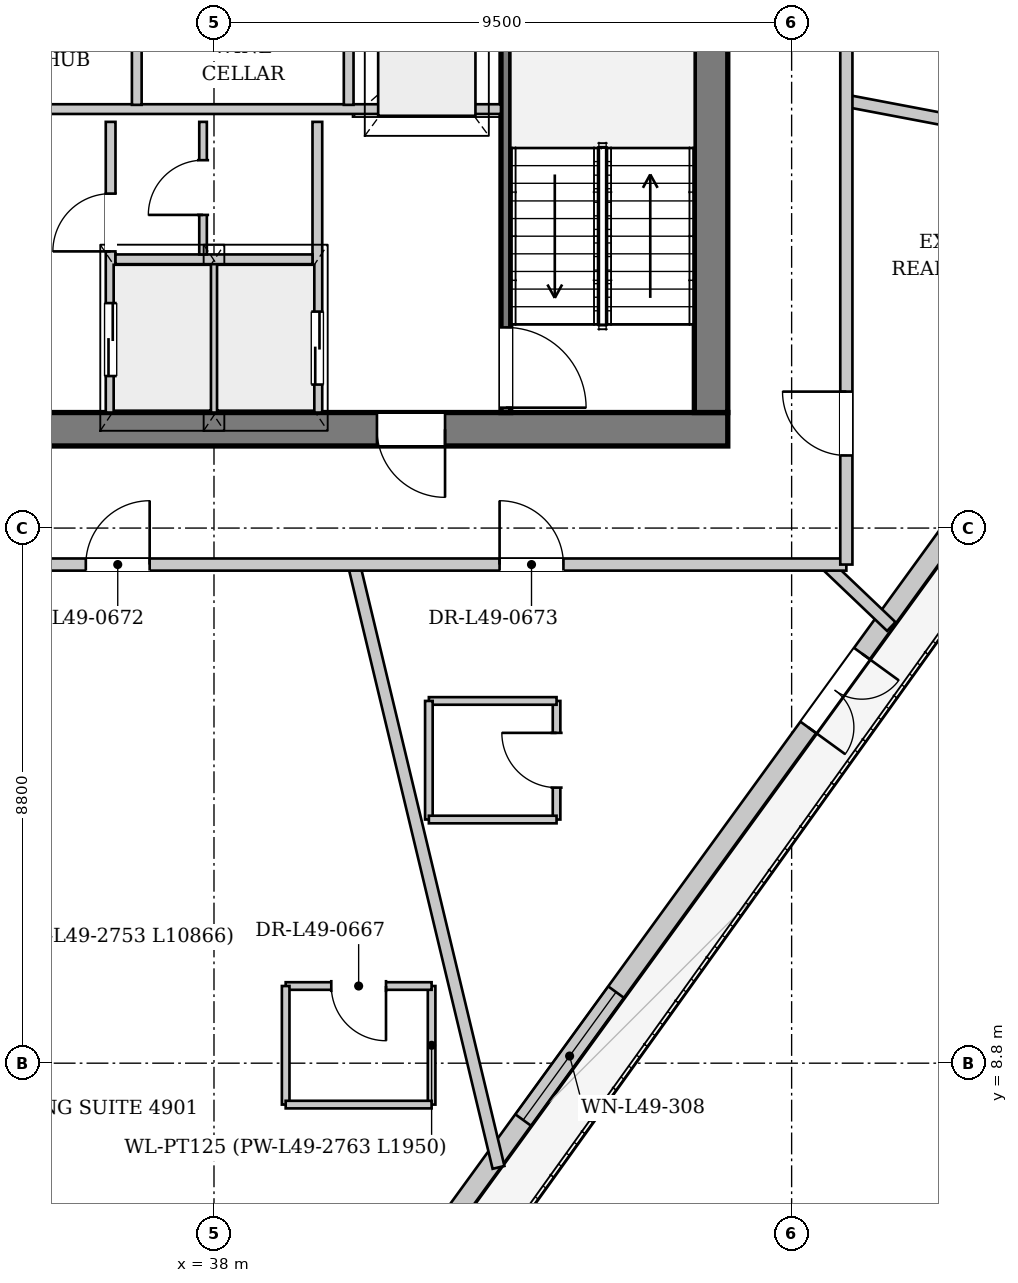
"""IFC4 building model, lengths in metres.
Left out: names, types, materials, properties, quantities, classifications, styles, units other than length and angle.
Written with IfcOpenShell. Run it as: python <this file> out.ifc"""

import sys

from ifc_helpers import new_model, si_unit, direction, frame, frame_2d, origin, place, context, subcontext, project, spatial, rectangle, extrude, source, transform, mapped, element, fill, save


model = new_model("IFC4")
c1 = context("Model", 3, precision=1e-05, world=origin(), true_north=direction((0.0, 1.0)))
c2 = subcontext(c1, "Body", "Model", "MODEL_VIEW")
j1 = project(units=[si_unit("LENGTHUNIT", "METRE"), si_unit("PLANEANGLEUNIT", "RADIAN")], contexts=[c1])
p1 = place(None, origin())
s1 = spatial("IfcSite", under=j1, at=p1, CompositionType="ELEMENT")
p2 = place(p1, origin())
s2 = spatial("IfcBuilding", under=s1, at=p2, CompositionType="ELEMENT")
p3 = place(p2, frame((0.0, 0.0, 185.65)))
s3 = spatial("IfcBuildingStorey", under=s2, at=p3, CompositionType="ELEMENT", Elevation=185.65)
p4 = place(p3, frame((53.034, 21.565, 0.0), z_axis=(0.0, 0.0, 1.0), x_axis=(-0.58764790483, -0.809116765337, 0.0)))
e1 = element("IfcWall", 1, at=p4, inside=s3, PredefinedType="SOLIDWALL", context=c2, shape_type="SweptSolid", body=[
    extrude(rectangle(XDim=23.285, YDim=0.32, at=frame_2d((11.643, 0.0))), origin(), (0.0, 0.0, 1.0), 2.722),
])
p5 = place(p4, frame((7.451, 0.0, 0.0)))
e2 = element("IfcOpeningElement", 2, at=p5, cuts=e1, PredefinedType="OPENING", context=c2, shape_type="SweptSolid", body=[
    extrude(rectangle(XDim=1.5, YDim=2.3, at=frame_2d((0.75, 1.15))), frame((0.0, 0.17, 0.0), z_axis=(0.0, -1.0, 0.0), x_axis=(1.0, 0.0, 0.0)), (0.0, 0.0, 1.0), 0.34),
])
p6 = place(p4, frame((14.331, 0.0, 0.252)))
e3 = element("IfcOpeningElement", 3, at=p6, cuts=e1, PredefinedType="OPENING", context=c2, shape_type="SweptSolid", body=[
    extrude(rectangle(XDim=2.6, YDim=2.35, at=frame_2d((1.3, 1.175))), frame((0.0, 0.17, 0.0), z_axis=(0.0, -1.0, 0.0), x_axis=(1.0, 0.0, 0.0)), (0.0, 0.0, 1.0), 0.34),
])
p7 = place(p3, frame((46.45, 19.225, 0.0), z_axis=(0.0, 0.0, 1.0), x_axis=(-1.0, 0.0, 0.0)))
e4 = element("IfcWall", 4, at=p7, inside=s3, PredefinedType="SHEAR", context=c2, shape_type="SweptSolid", body=[
    extrude(rectangle(XDim=16.9, YDim=0.55, at=frame_2d((8.45, 0.0))), origin(), (0.0, 0.0, 1.0), 3.33),
])
p8 = place(p7, frame((4.65, 0.0, 0.0)))
e5 = element("IfcOpeningElement", 5, at=p8, cuts=e4, PredefinedType="OPENING", context=c2, shape_type="SweptSolid", body=[
    extrude(rectangle(XDim=1.12, YDim=2.25, at=frame_2d((0.56, 1.125))), frame((0.0, 0.285, 0.0), z_axis=(0.0, -1.0, 0.0), x_axis=(1.0, 0.0, 0.0)), (0.0, 0.0, 1.0), 0.57),
])
p9 = place(p7, frame((11.15, 0.0, 0.0)))
e6 = element("IfcOpeningElement", 6, at=p9, cuts=e4, PredefinedType="OPENING", context=c2, shape_type="SweptSolid", body=[
    extrude(rectangle(XDim=1.12, YDim=2.25, at=frame_2d((0.56, 1.125))), frame((0.0, 0.285, 0.0), z_axis=(0.0, -1.0, 0.0), x_axis=(1.0, 0.0, 0.0)), (0.0, 0.0, 1.0), 0.57),
])
p10 = place(p3, frame((46.175, 33.7, 0.0), z_axis=(0.0, 0.0, 1.0), x_axis=(0.0, -1.0, 0.0)))
e7 = element("IfcWall", 7, at=p10, inside=s3, PredefinedType="SHEAR", context=c2, shape_type="SweptSolid", body=[
    extrude(rectangle(XDim=14.2, YDim=0.55, at=frame_2d((7.1, 0.0))), origin(), (0.0, 0.0, 1.0), 3.33),
])
p11 = place(p10, frame((5.18, 0.0, 0.0)))
e8 = element("IfcOpeningElement", 8, at=p11, cuts=e7, PredefinedType="OPENING", context=c2, shape_type="SweptSolid", body=[
    extrude(rectangle(XDim=1.6, YDim=2.2, at=frame_2d((0.8, 1.1))), frame((0.0, 0.285, 0.0), z_axis=(0.0, -1.0, 0.0), x_axis=(1.0, 0.0, 0.0)), (0.0, 0.0, 1.0), 0.57),
])
p12 = place(p10, frame((2.05, 0.0, 0.0)))
e9 = element("IfcOpeningElement", 9, at=p12, cuts=e7, PredefinedType="OPENING", context=c2, shape_type="SweptSolid", body=[
    extrude(rectangle(XDim=0.95, YDim=2.1, at=frame_2d((0.475, 1.05))), frame((0.0, 0.285, 0.0), z_axis=(0.0, -1.0, 0.0), x_axis=(1.0, 0.0, 0.0)), (0.0, 0.0, 1.0), 0.57),
])
p13 = place(p3, frame((42.8, 26.96, 0.0), z_axis=(0.0, 0.0, 1.0), x_axis=(0.0, -1.0, 0.0)))
e10 = element("IfcWall", 10, at=p13, inside=s3, PredefinedType="PARTITIONING", context=c2, shape_type="SweptSolid", body=[
    extrude(rectangle(XDim=7.46, YDim=0.16, at=frame_2d((3.73, 0.0))), origin(), (0.0, 0.0, 1.0), 3.33),
])
p14 = place(p13, frame((6.06, 0.0, 0.0)))
e11 = element("IfcOpeningElement", 11, at=p14, cuts=e10, PredefinedType="OPENING", context=c2, shape_type="SweptSolid", body=[
    extrude(rectangle(XDim=1.32, YDim=2.2, at=frame_2d((0.66, 1.1))), frame((0.0, 0.09, 0.0), z_axis=(0.0, -1.0, 0.0), x_axis=(1.0, 0.0, 0.0)), (0.0, 0.0, 1.0), 0.18),
])
p15 = place(p3, frame((36.3, 19.5, 0.0), z_axis=(0.0, 0.0, 1.0), x_axis=(0.0, 1.0, 0.0)))
e12 = element("IfcWall", 12, at=p15, inside=s3, PredefinedType="PARTITIONING", context=c2, shape_type="SweptSolid", body=[
    extrude(rectangle(XDim=4.78, YDim=0.16, at=frame_2d((2.39, 0.0))), origin(), (0.0, 0.0, 1.0), 3.33),
])
p16 = place(p15, frame((0.6, 0.0, 0.0)))
e13 = element("IfcOpeningElement", 13, at=p16, cuts=e12, PredefinedType="OPENING", context=c2, shape_type="SweptSolid", body=[
    extrude(rectangle(XDim=1.2, YDim=2.2, at=frame_2d((0.6, 1.1))), frame((0.0, 0.09, 0.0), z_axis=(0.0, -1.0, 0.0), x_axis=(1.0, 0.0, 0.0)), (0.0, 0.0, 1.0), 0.18),
])
p17 = place(p15, frame((2.65, 0.0, 0.0)))
e14 = element("IfcOpeningElement", 14, at=p17, cuts=e12, PredefinedType="OPENING", context=c2, shape_type="SweptSolid", body=[
    extrude(rectangle(XDim=0.95, YDim=2.1, at=frame_2d((0.475, 1.05))), frame((0.0, 0.09, 0.0), z_axis=(0.0, -1.0, 0.0), x_axis=(1.0, 0.0, 0.0)), (0.0, 0.0, 1.0), 0.18),
])
p18 = place(p3, frame((39.7, 24.28, 0.0), z_axis=(0.0, 0.0, 1.0), x_axis=(0.0, -1.0, 0.0)))
e15 = element("IfcWall", 15, at=p18, inside=s3, PredefinedType="PARTITIONING", context=c2, shape_type="SweptSolid", body=[
    extrude(rectangle(XDim=4.78, YDim=0.16, at=frame_2d((2.39, 0.0))), origin(), (0.0, 0.0, 1.0), 3.33),
])
p19 = place(p18, frame((3.12, 0.0, 0.0)))
e16 = element("IfcOpeningElement", 16, at=p19, cuts=e15, PredefinedType="OPENING", context=c2, shape_type="SweptSolid", body=[
    extrude(rectangle(XDim=1.2, YDim=2.2, at=frame_2d((0.6, 1.1))), frame((0.0, 0.09, 0.0), z_axis=(0.0, -1.0, 0.0), x_axis=(1.0, 0.0, 0.0)), (0.0, 0.0, 1.0), 0.18),
])
p20 = place(p3, frame((38.0, 19.5, 0.0), z_axis=(0.0, 0.0, 1.0), x_axis=(0.0, 1.0, 0.0)))
e17 = element("IfcWall", 17, at=p20, inside=s3, PredefinedType="PARTITIONING", context=c2, shape_type="SweptSolid", body=[
    extrude(rectangle(XDim=2.46, YDim=0.125, at=frame_2d((1.23, 0.0))), origin(), (0.0, 0.0, 1.0), 3.33),
])
p21 = place(p3, frame((36.38, 22.02, 0.0), z_axis=(0.0, 0.0, 1.0), x_axis=(1.0, 0.0, 0.0)))
e18 = element("IfcWall", 18, at=p21, inside=s3, PredefinedType="PARTITIONING", context=c2, shape_type="SweptSolid", body=[
    extrude(rectangle(XDim=3.24, YDim=0.16, at=frame_2d((1.62, 0.0))), origin(), (0.0, 0.0, 1.0), 3.33),
])
p22 = place(p3, frame((33.28, 24.49, 0.0), z_axis=(0.0, 0.0, 1.0), x_axis=(1.0, 0.0, 0.0)))
e19 = element("IfcWall", 19, at=p22, inside=s3, PredefinedType="PARTITIONING", context=c2, shape_type="SweptSolid", body=[
    extrude(rectangle(XDim=9.44, YDim=0.16, at=frame_2d((4.72, 0.0))), origin(), (0.0, 0.0, 1.0), 3.33),
])
p23 = place(p3, frame((37.82, 22.1, 0.0), z_axis=(0.0, 0.0, 1.0), x_axis=(0.0, 1.0, 0.0)))
e20 = element("IfcWall", 20, at=p23, inside=s3, PredefinedType="PARTITIONING", context=c2, shape_type="SweptSolid", body=[
    extrude(rectangle(XDim=2.18, YDim=0.125, at=frame_2d((1.09, 0.0))), origin(), (0.0, 0.0, 1.0), 3.33),
])
p24 = place(p23, frame((0.65, 0.0, 0.0)))
e21 = element("IfcOpeningElement", 21, at=p24, cuts=e20, PredefinedType="OPENING", context=c2, shape_type="SweptSolid", body=[
    extrude(rectangle(XDim=0.9, YDim=2.1, at=frame_2d((0.45, 1.05))), frame((0.0, 0.073, 0.0), z_axis=(0.0, -1.0, 0.0), x_axis=(1.0, 0.0, 0.0)), (0.0, 0.0, 1.0), 0.145),
])
for number, where, z_axis, x_axis in (
    (22, (36.73, 24.56, 0.0), (0.0, 0.0, 1.0), (0.0, 1.0, 0.0)),
    (23, (40.215, 24.56, 0.0), (0.0, 0.0, 1.0), (0.0, 1.0, 0.0)),
):
    element("IfcWall", number, at=place(p3, frame(where, z_axis=z_axis, x_axis=x_axis)), inside=s3, PredefinedType="PARTITIONING", context=c2, shape_type="SweptSolid", body=[
        extrude(rectangle(XDim=2.31, YDim=0.16, at=frame_2d((1.155, 0.0))), origin(), (0.0, 0.0, 1.0), 3.33),
    ])
p25 = place(p3, frame((40.302, 17.0, 0.0), z_axis=(0.0, 0.0, 1.0), x_axis=(0.233176404648, -0.972434452452, 0.0)))
e24 = element("IfcWall", 24, at=p25, inside=s3, PredefinedType="PARTITIONING", context=c2, shape_type="SweptSolid", body=[
    extrude(rectangle(XDim=10.195, YDim=0.2, at=frame_2d((5.097, 0.0))), origin(), (0.0, 0.0, 1.0), 3.33),
])
p26 = place(p3, frame((48.07, 17.0, 0.0), z_axis=(0.0, 0.0, 1.0), x_axis=(0.723764420098, -0.69004714636, 0.0)))
e25 = element("IfcWall", 25, at=p26, inside=s3, PredefinedType="PARTITIONING", context=c2, shape_type="SweptSolid", body=[
    extrude(rectangle(XDim=1.477, YDim=0.2, at=frame_2d((0.739, 0.0))), origin(), (0.0, 0.0, 1.0), 3.33),
])
p27 = place(p3, frame((48.4, 24.626, 0.0), z_axis=(0.0, 0.0, 1.0), x_axis=(0.982464340051, -0.186450584681, 0.0)))
e26 = element("IfcWall", 26, at=p27, inside=s3, PredefinedType="PARTITIONING", context=c2, shape_type="SweptSolid", body=[
    extrude(rectangle(XDim=5.698, YDim=0.2, at=frame_2d((2.849, 0.0))), origin(), (0.0, 0.0, 1.0), 3.33),
])
p28 = place(p3, frame((41.579, 8.119, 0.0), z_axis=(0.0, 0.0, 1.0), x_axis=(0.0, 1.0, 0.0)))
e27 = element("IfcWall", 27, at=p28, inside=s3, PredefinedType="PARTITIONING", context=c2, shape_type="SweptSolid", body=[
    extrude(rectangle(XDim=1.95, YDim=0.125, at=frame_2d((0.975, 0.0))), origin(), (0.0, 0.0, 1.0), 3.33),
])
p29 = place(p3, frame((41.579, 10.069, 0.0), z_axis=(0.0, 0.0, 1.0), x_axis=(-1.0, 0.0, 0.0)))
e28 = element("IfcWall", 28, at=p29, inside=s3, PredefinedType="PARTITIONING", context=c2, shape_type="SweptSolid", body=[
    extrude(rectangle(XDim=2.4, YDim=0.125, at=frame_2d((1.2, 0.0))), origin(), (0.0, 0.0, 1.0), 3.33),
])
p30 = place(p29, frame((0.75, 0.0, 0.0)))
e29 = element("IfcOpeningElement", 29, at=p30, cuts=e28, PredefinedType="OPENING", context=c2, shape_type="SweptSolid", body=[
    extrude(rectangle(XDim=0.9, YDim=2.1, at=frame_2d((0.45, 1.05))), frame((0.0, 0.073, 0.0), z_axis=(0.0, -1.0, 0.0), x_axis=(1.0, 0.0, 0.0)), (0.0, 0.0, 1.0), 0.145),
])
p31 = place(p3, frame((39.179, 10.069, 0.0), z_axis=(0.0, 0.0, 1.0), x_axis=(0.0, -1.0, 0.0)))
e30 = element("IfcWall", 30, at=p31, inside=s3, PredefinedType="PARTITIONING", context=c2, shape_type="SweptSolid", body=[
    extrude(rectangle(XDim=1.95, YDim=0.125, at=frame_2d((0.975, 0.0))), origin(), (0.0, 0.0, 1.0), 3.005),
])
p32 = place(p3, frame((39.179, 8.119, 0.0), z_axis=(0.0, 0.0, 1.0), x_axis=(1.0, 0.0, 0.0)))
e31 = element("IfcWall", 31, at=p32, inside=s3, PredefinedType="PARTITIONING", context=c2, shape_type="SweptSolid", body=[
    extrude(rectangle(XDim=2.4, YDim=0.125, at=frame_2d((1.2, 0.0))), origin(), (0.0, 0.0, 1.0), 3.33),
])
p33 = place(p3, frame((43.634, 12.807, 0.0), z_axis=(0.0, 0.0, 1.0), x_axis=(0.0, 1.0, 0.0)))
e32 = element("IfcWall", 32, at=p33, inside=s3, PredefinedType="PARTITIONING", context=c2, shape_type="SweptSolid", body=[
    extrude(rectangle(XDim=1.95, YDim=0.125, at=frame_2d((0.975, 0.0))), origin(), (0.0, 0.0, 1.0), 3.33),
])
p34 = place(p33, frame((0.525, 0.0, 0.0)))
e33 = element("IfcOpeningElement", 33, at=p34, cuts=e32, PredefinedType="OPENING", context=c2, shape_type="SweptSolid", body=[
    extrude(rectangle(XDim=0.9, YDim=2.1, at=frame_2d((0.45, 1.05))), frame((0.0, 0.073, 0.0), z_axis=(0.0, -1.0, 0.0), x_axis=(1.0, 0.0, 0.0)), (0.0, 0.0, 1.0), 0.145),
])
p35 = place(p3, frame((43.634, 14.757, 0.0), z_axis=(0.0, 0.0, 1.0), x_axis=(-1.0, 0.0, 0.0)))
e34 = element("IfcWall", 34, at=p35, inside=s3, PredefinedType="PARTITIONING", context=c2, shape_type="SweptSolid", body=[
    extrude(rectangle(XDim=2.1, YDim=0.125, at=frame_2d((1.05, 0.0))), origin(), (0.0, 0.0, 1.0), 3.33),
])
p36 = place(p3, frame((41.534, 14.757, 0.0), z_axis=(0.0, 0.0, 1.0), x_axis=(0.0, -1.0, 0.0)))
e35 = element("IfcWall", 35, at=p36, inside=s3, PredefinedType="PARTITIONING", context=c2, shape_type="SweptSolid", body=[
    extrude(rectangle(XDim=1.95, YDim=0.125, at=frame_2d((0.975, 0.0))), origin(), (0.0, 0.0, 1.0), 3.33),
])
p37 = place(p3, frame((41.534, 12.807, 0.0), z_axis=(0.0, 0.0, 1.0), x_axis=(1.0, 0.0, 0.0)))
e36 = element("IfcWall", 36, at=p37, inside=s3, PredefinedType="PARTITIONING", context=c2, shape_type="SweptSolid", body=[
    extrude(rectangle(XDim=2.1, YDim=0.125, at=frame_2d((1.05, 0.0))), origin(), (0.0, 0.0, 1.0), 3.33),
])
p38 = place(p3, frame((27.6, 17.0, 0.0), z_axis=(0.0, 0.0, 1.0), x_axis=(1.0, 0.0, 0.0)))
e37 = element("IfcWall", 37, at=p38, inside=s3, PredefinedType="PARTITIONING", context=c2, shape_type="SweptSolid", body=[
    extrude(rectangle(XDim=20.8, YDim=0.2, at=frame_2d((10.4, 0.0))), origin(), (0.0, 0.0, 1.0), 3.33),
])
p39 = place(p38, frame((8.292, 0.0, 0.0)))
e38 = element("IfcOpeningElement", 38, at=p39, cuts=e37, PredefinedType="OPENING", context=c2, shape_type="SweptSolid", body=[
    extrude(rectangle(XDim=1.05, YDim=2.2, at=frame_2d((0.525, 1.1))), frame((0.0, 0.11, 0.0), z_axis=(0.0, -1.0, 0.0), x_axis=(1.0, 0.0, 0.0)), (0.0, 0.0, 1.0), 0.22),
])
p40 = place(p38, frame((15.097, 0.0, 0.0)))
e39 = element("IfcOpeningElement", 39, at=p40, cuts=e37, PredefinedType="OPENING", context=c2, shape_type="SweptSolid", body=[
    extrude(rectangle(XDim=1.05, YDim=2.2, at=frame_2d((0.525, 1.1))), frame((0.0, 0.11, 0.0), z_axis=(0.0, -1.0, 0.0), x_axis=(1.0, 0.0, 0.0)), (0.0, 0.0, 1.0), 0.22),
])
p41 = place(p38, frame((1.25, 0.0, 0.0)))
e40 = element("IfcOpeningElement", 40, at=p41, cuts=e37, PredefinedType="OPENING", context=c2, shape_type="SweptSolid", body=[
    extrude(rectangle(XDim=1.05, YDim=2.2, at=frame_2d((0.525, 1.1))), frame((0.0, 0.11, 0.0), z_axis=(0.0, -1.0, 0.0), x_axis=(1.0, 0.0, 0.0)), (0.0, 0.0, 1.0), 0.22),
])
p42 = place(p3, frame((48.4, 17.0, 0.0), z_axis=(0.0, 0.0, 1.0), x_axis=(0.0, 1.0, 0.0)))
e41 = element("IfcWall", 41, at=p42, inside=s3, PredefinedType="PARTITIONING", context=c2, shape_type="SweptSolid", body=[
    extrude(rectangle(XDim=19.2, YDim=0.2, at=frame_2d((9.6, 0.0))), origin(), (0.0, 0.0, 1.0), 3.33),
])
p43 = place(p42, frame((1.794, 0.0, 0.0)))
e42 = element("IfcOpeningElement", 42, at=p43, cuts=e41, PredefinedType="OPENING", context=c2, shape_type="SweptSolid", body=[
    extrude(rectangle(XDim=1.05, YDim=2.2, at=frame_2d((0.525, 1.1))), frame((0.0, 0.11, 0.0), z_axis=(0.0, -1.0, 0.0), x_axis=(1.0, 0.0, 0.0)), (0.0, 0.0, 1.0), 0.22),
])
p44 = place(p42, frame((9.465, 0.0, 0.0)))
e43 = element("IfcOpeningElement", 43, at=p44, cuts=e41, PredefinedType="OPENING", context=c2, shape_type="SweptSolid", body=[
    extrude(rectangle(XDim=1.05, YDim=2.2, at=frame_2d((0.525, 1.1))), frame((0.0, 0.11, 0.0), z_axis=(0.0, -1.0, 0.0), x_axis=(1.0, 0.0, 0.0)), (0.0, 0.0, 1.0), 0.22),
])
m1 = source(origin(), c2, "Body", "SweptSolid", [
    extrude(rectangle(XDim=1.5, YDim=2.3, at=frame_2d((0.75, 1.15))), frame((0.0, 0.025, 0.0), z_axis=(0.0, -1.0, 0.0), x_axis=(1.0, 0.0, 0.0)), (0.0, 0.0, 1.0), 0.05),
])
p45 = place(p5, origin())
e44 = element("IfcDoor", 44, at=p45, inside=s3, OperationType="DOUBLE_DOOR_SINGLE_SWING", PredefinedType="DOOR", context=c2, shape_type="MappedRepresentation", body=[
    mapped(m1, transform((0.0, 0.0, 0.0), x_axis=(1.0, 0.0, 0.0), y_axis=(0.0, 1.0, 0.0), z_axis=(0.0, 0.0, 1.0), scale=1.0)),
])
fill(e2, e44)
m2 = source(origin(), c2, "Body", "SweptSolid", [
    extrude(rectangle(XDim=2.6, YDim=2.35, at=frame_2d((1.3, 1.175))), frame((0.0, 0.03, 0.0), z_axis=(0.0, -1.0, 0.0), x_axis=(1.0, 0.0, 0.0)), (0.0, 0.0, 1.0), 0.06),
])
p46 = place(p6, origin())
e45 = element("IfcWindow", 45, at=p46, inside=s3, PartitioningType="SINGLE_PANEL", PredefinedType="WINDOW", context=c2, shape_type="MappedRepresentation", body=[
    mapped(m2, transform((0.0, 0.0, 0.0), x_axis=(1.0, 0.0, 0.0), y_axis=(0.0, 1.0, 0.0), z_axis=(0.0, 0.0, 1.0), scale=1.0)),
])
fill(e3, e45)
m3 = source(origin(), c2, "Body", "SweptSolid", [
    extrude(rectangle(XDim=1.12, YDim=2.25, at=frame_2d((0.56, 1.125))), frame((0.0, 0.025, 0.0), z_axis=(0.0, -1.0, 0.0), x_axis=(1.0, 0.0, 0.0)), (0.0, 0.0, 1.0), 0.05),
])
p47 = place(p8, origin())
e46 = element("IfcDoor", 46, at=p47, inside=s3, OperationType="SINGLE_SWING_LEFT", PredefinedType="DOOR", context=c2, shape_type="MappedRepresentation", body=[
    mapped(m3, transform((0.0, 0.0, 0.0), x_axis=(1.0, 0.0, 0.0), y_axis=(0.0, 1.0, 0.0), z_axis=(0.0, 0.0, 1.0), scale=1.0)),
])
fill(e5, e46)
m4 = source(origin(), c2, "Body", "SweptSolid", [
    extrude(rectangle(XDim=1.32, YDim=2.2, at=frame_2d((0.66, 1.1))), frame((0.0, 0.025, 0.0), z_axis=(0.0, -1.0, 0.0), x_axis=(1.0, 0.0, 0.0)), (0.0, 0.0, 1.0), 0.05),
])
p48 = place(p14, origin())
e47 = element("IfcDoor", 47, at=p48, inside=s3, OperationType="SINGLE_SWING_RIGHT", PredefinedType="DOOR", context=c2, shape_type="MappedRepresentation", body=[
    mapped(m4, transform((0.0, 0.0, 0.0), x_axis=(1.0, 0.0, 0.0), y_axis=(0.0, 1.0, 0.0), z_axis=(0.0, 0.0, 1.0), scale=1.0)),
])
fill(e11, e47)
m5 = source(origin(), c2, "Body", "SweptSolid", [
    extrude(rectangle(XDim=1.2, YDim=2.2, at=frame_2d((0.6, 1.1))), frame((0.0, 0.025, 0.0), z_axis=(0.0, -1.0, 0.0), x_axis=(1.0, 0.0, 0.0)), (0.0, 0.0, 1.0), 0.05),
])
p49 = place(p16, origin())
e48 = element("IfcDoor", 48, at=p49, inside=s3, OperationType="DOUBLE_DOOR_SLIDING", PredefinedType="DOOR", context=c2, shape_type="MappedRepresentation", body=[
    mapped(m5, transform((0.0, 0.0, 0.0), x_axis=(1.0, 0.0, 0.0), y_axis=(0.0, 1.0, 0.0), z_axis=(0.0, 0.0, 1.0), scale=1.0)),
])
fill(e13, e48)
m6 = source(origin(), c2, "Body", "SweptSolid", [
    extrude(rectangle(XDim=0.95, YDim=2.1, at=frame_2d((0.475, 1.05))), frame((0.0, 0.025, 0.0), z_axis=(0.0, -1.0, 0.0), x_axis=(1.0, 0.0, 0.0)), (0.0, 0.0, 1.0), 0.05),
])
p50 = place(p17, origin())
e49 = element("IfcDoor", 49, at=p50, inside=s3, OperationType="SINGLE_SWING_LEFT", PredefinedType="DOOR", context=c2, shape_type="MappedRepresentation", body=[
    mapped(m6, transform((0.0, 0.0, 0.0), x_axis=(1.0, 0.0, 0.0), y_axis=(0.0, 1.0, 0.0), z_axis=(0.0, 0.0, 1.0), scale=1.0)),
])
fill(e14, e49)
m7 = source(origin(), c2, "Body", "SweptSolid", [
    extrude(rectangle(XDim=0.9, YDim=2.1, at=frame_2d((0.45, 1.05))), frame((0.0, 0.025, 0.0), z_axis=(0.0, -1.0, 0.0), x_axis=(1.0, 0.0, 0.0)), (0.0, 0.0, 1.0), 0.05),
])
p51 = place(p24, origin())
e50 = element("IfcDoor", 50, at=p51, inside=s3, OperationType="SINGLE_SWING_LEFT", PredefinedType="DOOR", context=c2, shape_type="MappedRepresentation", body=[
    mapped(m7, transform((0.0, 0.0, 0.0), x_axis=(1.0, 0.0, 0.0), y_axis=(0.0, 1.0, 0.0), z_axis=(0.0, 0.0, 1.0), scale=1.0)),
])
fill(e21, e50)
p52 = place(p19, origin())
e51 = element("IfcDoor", 51, at=p52, inside=s3, OperationType="DOUBLE_DOOR_SLIDING", PredefinedType="DOOR", context=c2, shape_type="MappedRepresentation", body=[
    mapped(m5, transform((0.0, 0.0, 0.0), x_axis=(1.0, 0.0, 0.0), y_axis=(0.0, 1.0, 0.0), z_axis=(0.0, 0.0, 1.0), scale=1.0)),
])
fill(e16, e51)
p53 = place(p30, origin())
e52 = element("IfcDoor", 52, at=p53, inside=s3, OperationType="SINGLE_SWING_LEFT", PredefinedType="DOOR", context=c2, shape_type="MappedRepresentation", body=[
    mapped(m7, transform((0.0, 0.0, 0.0), x_axis=(1.0, 0.0, 0.0), y_axis=(0.0, 1.0, 0.0), z_axis=(0.0, 0.0, 1.0), scale=1.0)),
])
fill(e29, e52)
p54 = place(p34, origin())
e53 = element("IfcDoor", 53, at=p54, inside=s3, OperationType="SINGLE_SWING_RIGHT", PredefinedType="DOOR", context=c2, shape_type="MappedRepresentation", body=[
    mapped(m7, transform((0.0, 0.0, 0.0), x_axis=(1.0, 0.0, 0.0), y_axis=(0.0, 1.0, 0.0), z_axis=(0.0, 0.0, 1.0), scale=1.0)),
])
fill(e33, e53)
m8 = source(origin(), c2, "Body", "SweptSolid", [
    extrude(rectangle(XDim=1.05, YDim=2.2, at=frame_2d((0.525, 1.1))), frame((0.0, 0.025, 0.0), z_axis=(0.0, -1.0, 0.0), x_axis=(1.0, 0.0, 0.0)), (0.0, 0.0, 1.0), 0.05),
])
p55 = place(p39, origin())
e54 = element("IfcDoor", 54, at=p55, inside=s3, OperationType="SINGLE_SWING_RIGHT", PredefinedType="DOOR", context=c2, shape_type="MappedRepresentation", body=[
    mapped(m8, transform((0.0, 0.0, 0.0), x_axis=(1.0, 0.0, 0.0), y_axis=(0.0, 1.0, 0.0), z_axis=(0.0, 0.0, 1.0), scale=1.0)),
])
fill(e38, e54)
p56 = place(p40, origin())
e55 = element("IfcDoor", 55, at=p56, inside=s3, OperationType="SINGLE_SWING_LEFT", PredefinedType="DOOR", context=c2, shape_type="MappedRepresentation", body=[
    mapped(m8, transform((0.0, 0.0, 0.0), x_axis=(1.0, 0.0, 0.0), y_axis=(0.0, 1.0, 0.0), z_axis=(0.0, 0.0, 1.0), scale=1.0)),
])
fill(e39, e55)
p57 = place(p43, origin())
e56 = element("IfcDoor", 56, at=p57, inside=s3, OperationType="SINGLE_SWING_RIGHT", PredefinedType="DOOR", context=c2, shape_type="MappedRepresentation", body=[
    mapped(m8, transform((0.0, 0.0, 0.0), x_axis=(1.0, 0.0, 0.0), y_axis=(0.0, 1.0, 0.0), z_axis=(0.0, 0.0, 1.0), scale=1.0)),
])
fill(e42, e56)
save(model, sys.argv[1])
